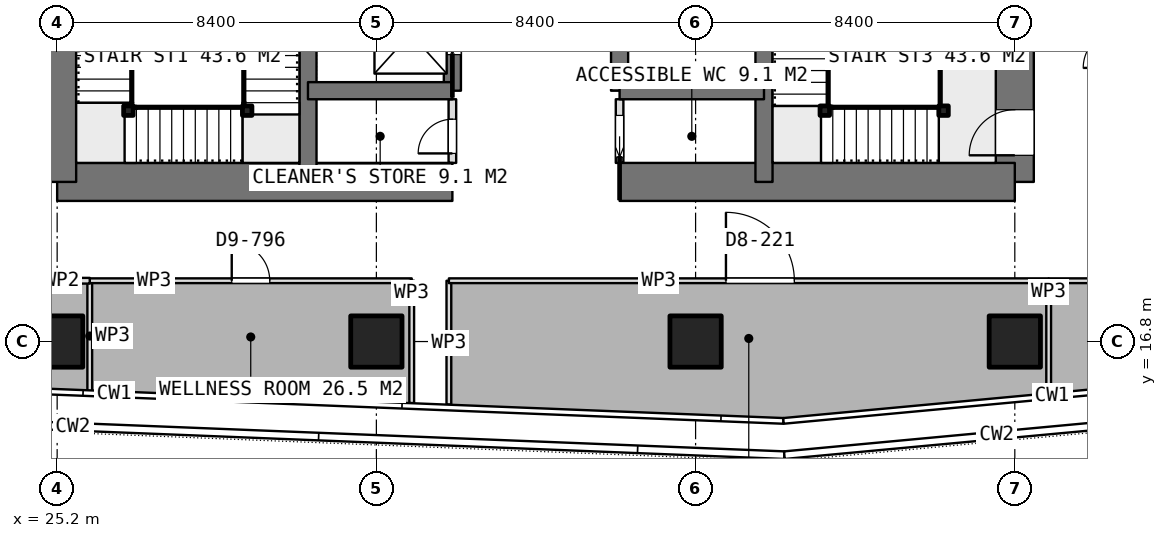
"""IFC4 building model, lengths in metres.
Left out: names, types, materials, properties, quantities, classifications, styles, units other than length and angle.
Written with IfcOpenShell. Run it as: python <this file> out.ifc"""

import sys

from ifc_helpers import new_model, si_unit, direction, frame, frame_2d, origin, origin_2d, place, context, subcontext, project, spatial, rectangle, extrude, element, fill, save


model = new_model("IFC4")
c1 = context("Model", 3, precision=1e-05, world=origin(), true_north=direction((0.0, 1.0)))
c2 = subcontext(c1, "Body", "Model", "MODEL_VIEW")
j1 = project(units=[si_unit("LENGTHUNIT", "METRE"), si_unit("PLANEANGLEUNIT", "RADIAN")], contexts=[c1])
p1 = place(None, origin())
s1 = spatial("IfcSite", under=j1, at=p1, CompositionType="ELEMENT")
p2 = place(p1, origin())
s2 = spatial("IfcBuilding", under=s1, at=p2, CompositionType="ELEMENT")
p3 = place(p2, frame((0.0, 0.0, 198.95)))
s3 = spatial("IfcBuildingStorey", under=s2, at=p3, CompositionType="ELEMENT", Elevation=198.95)
p4 = place(p3, frame((25.2, 21.0, 0.0), z_axis=(0.0, 0.0, 1.0), x_axis=(1.0, 0.0, 0.0)))
e1 = element("IfcWall", 1, at=p4, inside=s3, PredefinedType="SHEAR", context=c2, shape_type="SweptSolid", body=[
    extrude(rectangle(XDim=10.4, YDim=1.0, at=frame_2d((5.2, 0.0))), origin(), (0.0, 0.0, 1.0), 3.75),
])
p5 = place(p3, frame((40.0, 21.0, 0.0), z_axis=(0.0, 0.0, 1.0), x_axis=(1.0, 0.0, 0.0)))
e2 = element("IfcWall", 2, at=p5, inside=s3, PredefinedType="SHEAR", context=c2, shape_type="SweptSolid", body=[
    extrude(rectangle(XDim=10.4, YDim=1.0, at=frame_2d((5.2, 0.0))), origin(), (0.0, 0.0, 1.0), 3.75),
])
p6 = place(p3, frame((25.2, 21.0, 0.0), z_axis=(0.0, 0.0, 1.0), x_axis=(0.0, 1.0, 0.0)))
e3 = element("IfcWall", 3, at=p6, inside=s3, PredefinedType="SHEAR", context=c2, shape_type="SweptSolid", body=[
    extrude(rectangle(XDim=25.2, YDim=1.0, at=frame_2d((12.6, 0.0))), origin(), (0.0, 0.0, 1.0), 3.75),
])
p7 = place(p6, frame((7.8, 0.0, 0.0)))
e4 = element("IfcOpeningElement", 4, at=p7, cuts=e3, PredefinedType="OPENING", context=c2, shape_type="SweptSolid", body=[
    extrude(rectangle(XDim=1.2, YDim=2.1, at=frame_2d((0.6, 1.05))), frame((0.0, 0.51, 0.0), z_axis=(0.0, -1.0, 0.0), x_axis=(1.0, 0.0, 0.0)), (0.0, 0.0, 1.0), 1.02),
])
p8 = place(p6, frame((14.25, 0.0, 0.0)))
e5 = element("IfcOpeningElement", 5, at=p8, cuts=e3, PredefinedType="OPENING", context=c2, shape_type="SweptSolid", body=[
    extrude(rectangle(XDim=0.9, YDim=2.1, at=frame_2d((0.45, 1.05))), frame((0.0, 0.51, 0.0), z_axis=(0.0, -1.0, 0.0), x_axis=(1.0, 0.0, 0.0)), (0.0, 0.0, 1.0), 1.02),
])
p9 = place(p6, frame((16.85, 0.0, 0.0)))
e6 = element("IfcOpeningElement", 6, at=p9, cuts=e3, PredefinedType="OPENING", context=c2, shape_type="SweptSolid", body=[
    extrude(rectangle(XDim=0.9, YDim=2.1, at=frame_2d((0.45, 1.05))), frame((0.0, 0.51, 0.0), z_axis=(0.0, -1.0, 0.0), x_axis=(1.0, 0.0, 0.0)), (0.0, 0.0, 1.0), 1.02),
])
p10 = place(p6, frame((19.025, 0.0, 0.0)))
e7 = element("IfcOpeningElement", 7, at=p10, cuts=e3, PredefinedType="OPENING", context=c2, shape_type="SweptSolid", body=[
    extrude(rectangle(XDim=1.2, YDim=2.1, at=frame_2d((0.6, 1.05))), frame((0.0, 0.51, 0.0), z_axis=(0.0, -1.0, 0.0), x_axis=(1.0, 0.0, 0.0)), (0.0, 0.0, 1.0), 1.02),
])
p11 = place(p3, frame((50.4, 21.0, 0.0), z_axis=(0.0, 0.0, 1.0), x_axis=(0.0, 1.0, 0.0)))
e8 = element("IfcWall", 8, at=p11, inside=s3, PredefinedType="SHEAR", context=c2, shape_type="SweptSolid", body=[
    extrude(rectangle(XDim=25.2, YDim=1.0, at=frame_2d((12.6, 0.0))), origin(), (0.0, 0.0, 1.0), 3.75),
])
p12 = place(p11, frame((16.2, 0.0, 0.0)))
e9 = element("IfcOpeningElement", 9, at=p12, cuts=e8, PredefinedType="OPENING", context=c2, shape_type="SweptSolid", body=[
    extrude(rectangle(XDim=1.2, YDim=2.1, at=frame_2d((0.6, 1.05))), frame((0.0, 0.51, 0.0), z_axis=(0.0, -1.0, 0.0), x_axis=(1.0, 0.0, 0.0)), (0.0, 0.0, 1.0), 1.02),
])
p13 = place(p11, frame((10.05, 0.0, 0.0)))
e10 = element("IfcOpeningElement", 10, at=p13, cuts=e8, PredefinedType="OPENING", context=c2, shape_type="SweptSolid", body=[
    extrude(rectangle(XDim=0.9, YDim=2.1, at=frame_2d((0.45, 1.05))), frame((0.0, 0.51, 0.0), z_axis=(0.0, -1.0, 0.0), x_axis=(1.0, 0.0, 0.0)), (0.0, 0.0, 1.0), 1.02),
])
p14 = place(p11, frame((7.45, 0.0, 0.0)))
e11 = element("IfcOpeningElement", 11, at=p14, cuts=e8, PredefinedType="OPENING", context=c2, shape_type="SweptSolid", body=[
    extrude(rectangle(XDim=0.9, YDim=2.1, at=frame_2d((0.45, 1.05))), frame((0.0, 0.51, 0.0), z_axis=(0.0, -1.0, 0.0), x_axis=(1.0, 0.0, 0.0)), (0.0, 0.0, 1.0), 1.02),
])
p15 = place(p11, frame((0.7, 0.0, 0.0)))
e12 = element("IfcOpeningElement", 12, at=p15, cuts=e8, PredefinedType="OPENING", context=c2, shape_type="SweptSolid", body=[
    extrude(rectangle(XDim=1.2, YDim=2.1, at=frame_2d((0.6, 1.05))), frame((0.0, 0.51, 0.0), z_axis=(0.0, -1.0, 0.0), x_axis=(1.0, 0.0, 0.0)), (0.0, 0.0, 1.0), 1.02),
])
for number, where, z_axis, x_axis in (
    (13, (31.8, 21.0, 0.0), (0.0, 0.0, 1.0), (0.0, 1.0, 0.0)),
    (14, (43.8, 21.0, 0.0), (0.0, 0.0, 1.0), (0.0, 1.0, 0.0)),
):
    element("IfcWall", number, at=place(p3, frame(where, z_axis=z_axis, x_axis=x_axis)), inside=s3, PredefinedType="SHEAR", context=c2, shape_type="SweptSolid", body=[
        extrude(rectangle(XDim=25.2, YDim=0.45, at=frame_2d((12.6, 0.0))), origin(), (0.0, 0.0, 1.0), 3.75),
    ])
p16 = place(p3, frame((35.6, 23.4, 0.0), z_axis=(0.0, 0.0, 1.0), x_axis=(0.0, 1.0, 0.0)))
e15 = element("IfcWall", 15, at=p16, inside=s3, PredefinedType="SHEAR", context=c2, shape_type="SweptSolid", body=[
    extrude(rectangle(XDim=18.0, YDim=0.45, at=frame_2d((9.0, 0.0))), origin(), (0.0, 0.0, 1.0), 3.75),
])
p17 = place(p16, frame((0.95, 0.0, 0.0)))
e16 = element("IfcOpeningElement", 16, at=p17, cuts=e15, PredefinedType="OPENING", context=c2, shape_type="SweptSolid", body=[
    extrude(rectangle(XDim=1.1, YDim=2.1, at=frame_2d((0.55, 1.05))), frame((0.0, 0.235, 0.0), z_axis=(0.0, -1.0, 0.0), x_axis=(1.0, 0.0, 0.0)), (0.0, 0.0, 1.0), 0.47),
])
p18 = place(p16, frame((3.95, 0.0, 0.0)))
e17 = element("IfcOpeningElement", 17, at=p18, cuts=e15, PredefinedType="OPENING", context=c2, shape_type="SweptSolid", body=[
    extrude(rectangle(XDim=1.1, YDim=2.1, at=frame_2d((0.55, 1.05))), frame((0.0, 0.235, 0.0), z_axis=(0.0, -1.0, 0.0), x_axis=(1.0, 0.0, 0.0)), (0.0, 0.0, 1.0), 0.47),
])
p19 = place(p16, frame((6.95, 0.0, 0.0)))
e18 = element("IfcOpeningElement", 18, at=p19, cuts=e15, PredefinedType="OPENING", context=c2, shape_type="SweptSolid", body=[
    extrude(rectangle(XDim=1.1, YDim=2.1, at=frame_2d((0.55, 1.05))), frame((0.0, 0.235, 0.0), z_axis=(0.0, -1.0, 0.0), x_axis=(1.0, 0.0, 0.0)), (0.0, 0.0, 1.0), 0.47),
])
p20 = place(p16, frame((9.95, 0.0, 0.0)))
e19 = element("IfcOpeningElement", 19, at=p20, cuts=e15, PredefinedType="OPENING", context=c2, shape_type="SweptSolid", body=[
    extrude(rectangle(XDim=1.1, YDim=2.1, at=frame_2d((0.55, 1.05))), frame((0.0, 0.235, 0.0), z_axis=(0.0, -1.0, 0.0), x_axis=(1.0, 0.0, 0.0)), (0.0, 0.0, 1.0), 0.47),
])
p21 = place(p16, frame((12.95, 0.0, 0.0)))
e20 = element("IfcOpeningElement", 20, at=p21, cuts=e15, PredefinedType="OPENING", context=c2, shape_type="SweptSolid", body=[
    extrude(rectangle(XDim=1.1, YDim=2.1, at=frame_2d((0.55, 1.05))), frame((0.0, 0.235, 0.0), z_axis=(0.0, -1.0, 0.0), x_axis=(1.0, 0.0, 0.0)), (0.0, 0.0, 1.0), 0.47),
])
p22 = place(p16, frame((15.95, 0.0, 0.0)))
e21 = element("IfcOpeningElement", 21, at=p22, cuts=e15, PredefinedType="OPENING", context=c2, shape_type="SweptSolid", body=[
    extrude(rectangle(XDim=1.1, YDim=2.1, at=frame_2d((0.55, 1.05))), frame((0.0, 0.235, 0.0), z_axis=(0.0, -1.0, 0.0), x_axis=(1.0, 0.0, 0.0)), (0.0, 0.0, 1.0), 0.47),
])
p23 = place(p3, frame((40.0, 23.4, 0.0), z_axis=(0.0, 0.0, 1.0), x_axis=(0.0, 1.0, 0.0)))
e22 = element("IfcWall", 22, at=p23, inside=s3, PredefinedType="SHEAR", context=c2, shape_type="SweptSolid", body=[
    extrude(rectangle(XDim=18.0, YDim=0.45, at=frame_2d((9.0, 0.0))), origin(), (0.0, 0.0, 1.0), 3.75),
])
p24 = place(p23, frame((1.8, 0.0, 0.0)))
e23 = element("IfcOpeningElement", 23, at=p24, cuts=e22, PredefinedType="OPENING", context=c2, shape_type="SweptSolid", body=[
    extrude(rectangle(XDim=1.0, YDim=2.1, at=frame_2d((0.5, 1.05))), frame((0.0, 0.235, 0.0), z_axis=(0.0, -1.0, 0.0), x_axis=(1.0, 0.0, 0.0)), (0.0, 0.0, 1.0), 0.47),
])
p25 = place(p23, frame((5.75, 0.0, 0.0)))
e24 = element("IfcOpeningElement", 24, at=p25, cuts=e22, PredefinedType="OPENING", context=c2, shape_type="SweptSolid", body=[
    extrude(rectangle(XDim=0.9, YDim=2.1, at=frame_2d((0.45, 1.05))), frame((0.0, 0.235, 0.0), z_axis=(0.0, -1.0, 0.0), x_axis=(1.0, 0.0, 0.0)), (0.0, 0.0, 1.0), 0.47),
])
p26 = place(p23, frame((9.4, 0.0, 0.0)))
e25 = element("IfcOpeningElement", 25, at=p26, cuts=e22, PredefinedType="OPENING", context=c2, shape_type="SweptSolid", body=[
    extrude(rectangle(XDim=1.0, YDim=2.1, at=frame_2d((0.5, 1.05))), frame((0.0, 0.235, 0.0), z_axis=(0.0, -1.0, 0.0), x_axis=(1.0, 0.0, 0.0)), (0.0, 0.0, 1.0), 0.47),
])
for number, where, z_axis, x_axis in (
    (26, (31.8, 23.4, 0.0), (0.0, 0.0, 1.0), (1.0, 0.0, 0.0)),
    (27, (40.0, 23.4, 0.0), (0.0, 0.0, 1.0), (1.0, 0.0, 0.0)),
):
    element("IfcWall", number, at=place(p3, frame(where, z_axis=z_axis, x_axis=x_axis)), inside=s3, PredefinedType="SHEAR", context=c2, shape_type="SweptSolid", body=[
        extrude(rectangle(XDim=3.8, YDim=0.45, at=frame_2d((1.9, 0.0))), origin(), (0.0, 0.0, 1.0), 3.75),
    ])
for number, where, z_axis, x_axis in (
    (28, (25.2, 16.8, 0.0), (0.0, 0.0, 1.0), (1.0, 0.0, 0.0)),
    (29, (33.6, 16.8, 0.0), (0.0, 0.0, 1.0), (1.0, 0.0, 0.0)),
    (30, (42.0, 16.8, 0.0), (0.0, 0.0, 1.0), (1.0, 0.0, 0.0)),
    (31, (50.4, 16.8, 0.0), (0.0, 0.0, 1.0), (1.0, 0.0, 0.0)),
):
    element("IfcColumn", number, at=place(p3, frame(where, z_axis=z_axis, x_axis=x_axis)), inside=s3, PredefinedType="COLUMN", context=c2, shape_type="SweptSolid", body=[
        extrude(rectangle(XDim=1.35, YDim=1.35, at=origin_2d()), origin(), (0.0, 0.0, 1.0), 3.75),
    ])
p27 = place(p3, frame((40.0, 21.5, 0.0), z_axis=(0.0, 0.0, 1.0), x_axis=(0.0, 1.0, 0.0)))
e32 = element("IfcWall", 32, at=p27, inside=s3, PredefinedType="PARTITIONING", context=c2, shape_type="SweptSolid", body=[
    extrude(rectangle(XDim=1.675, YDim=0.2, at=frame_2d((0.837, 0.0))), origin(), (0.0, 0.0, 1.0), 3.5),
])
p28 = place(p27, frame((0.15, 0.0, 0.0)))
e33 = element("IfcOpeningElement", 33, at=p28, cuts=e32, PredefinedType="OPENING", context=c2, shape_type="SweptSolid", body=[
    extrude(rectangle(XDim=1.1, YDim=2.1, at=frame_2d((0.55, 1.05))), frame((0.0, 0.11, 0.0), z_axis=(0.0, -1.0, 0.0), x_axis=(1.0, 0.0, 0.0)), (0.0, 0.0, 1.0), 0.22),
])
p29 = place(p3, frame((35.6, 21.5, 0.0), z_axis=(0.0, 0.0, 1.0), x_axis=(0.0, 1.0, 0.0)))
e34 = element("IfcWall", 34, at=p29, inside=s3, PredefinedType="PARTITIONING", context=c2, shape_type="SweptSolid", body=[
    extrude(rectangle(XDim=1.675, YDim=0.2, at=frame_2d((0.837, 0.0))), origin(), (0.0, 0.0, 1.0), 3.5),
])
p30 = place(p29, frame((0.25, 0.0, 0.0)))
e35 = element("IfcOpeningElement", 35, at=p30, cuts=e34, PredefinedType="OPENING", context=c2, shape_type="SweptSolid", body=[
    extrude(rectangle(XDim=0.9, YDim=2.1, at=frame_2d((0.45, 1.05))), frame((0.0, 0.11, 0.0), z_axis=(0.0, -1.0, 0.0), x_axis=(1.0, 0.0, 0.0)), (0.0, 0.0, 1.0), 0.22),
])
p31 = place(p3, frame((51.291, 15.442, 0.0), z_axis=(0.0, 0.0, 1.0), x_axis=(0.0, 1.0, 0.0)))
e36 = element("IfcWall", 36, at=p31, inside=s3, PredefinedType="PARTITIONING", context=c2, shape_type="SweptSolid", body=[
    extrude(rectangle(XDim=2.958, YDim=0.125, at=frame_2d((1.479, 0.0))), origin(), (0.0, 0.0, 1.0), 3.5),
])
p32 = place(p3, frame((51.291, 18.4, 0.0), z_axis=(0.0, 0.0, 1.0), x_axis=(1.0, 0.0, 0.0)))
e37 = element("IfcWall", 37, at=p32, inside=s3, PredefinedType="PARTITIONING", context=c2, shape_type="SweptSolid", body=[
    extrude(rectangle(XDim=5.109, YDim=0.125, at=frame_2d((2.554, 0.0))), origin(), (0.0, 0.0, 1.0), 3.5),
])
p33 = place(p32, frame((2.055, 0.0, 0.0)))
e38 = element("IfcOpeningElement", 38, at=p33, cuts=e37, PredefinedType="OPENING", context=c2, shape_type="SweptSolid", body=[
    extrude(rectangle(XDim=1.0, YDim=2.1, at=frame_2d((0.5, 1.05))), frame((0.0, 0.073, 0.0), z_axis=(0.0, -1.0, 0.0), x_axis=(1.0, 0.0, 0.0)), (0.0, 0.0, 1.0), 0.145),
])
p34 = place(p3, frame((26.058, 15.49, 0.0), z_axis=(0.0, 0.0, 1.0), x_axis=(0.0, 1.0, 0.0)))
e39 = element("IfcWall", 39, at=p34, inside=s3, PredefinedType="PARTITIONING", context=c2, shape_type="SweptSolid", body=[
    extrude(rectangle(XDim=2.91, YDim=0.125, at=frame_2d((1.455, 0.0))), origin(), (0.0, 0.0, 1.0), 3.5),
])
p35 = place(p3, frame((26.058, 18.4, 0.0), z_axis=(0.0, 0.0, 1.0), x_axis=(1.0, 0.0, 0.0)))
e40 = element("IfcWall", 40, at=p35, inside=s3, PredefinedType="PARTITIONING", context=c2, shape_type="SweptSolid", body=[
    extrude(rectangle(XDim=8.472, YDim=0.125, at=frame_2d((4.236, 0.0))), origin(), (0.0, 0.0, 1.0), 3.5),
])
p36 = place(p35, frame((3.736, 0.0, 0.0)))
e41 = element("IfcOpeningElement", 41, at=p36, cuts=e40, PredefinedType="OPENING", context=c2, shape_type="SweptSolid", body=[
    extrude(rectangle(XDim=1.0, YDim=2.1, at=frame_2d((0.5, 1.05))), frame((0.0, 0.073, 0.0), z_axis=(0.0, -1.0, 0.0), x_axis=(1.0, 0.0, 0.0)), (0.0, 0.0, 1.0), 0.145),
])
p37 = place(p3, frame((34.53, 18.4, 0.0), z_axis=(0.0, 0.0, 1.0), x_axis=(0.0, -1.0, 0.0)))
e42 = element("IfcWall", 42, at=p37, inside=s3, PredefinedType="PARTITIONING", context=c2, shape_type="SweptSolid", body=[
    extrude(rectangle(XDim=3.218, YDim=0.125, at=frame_2d((1.609, 0.0))), origin(), (0.0, 0.0, 1.0), 3.5),
])
p38 = place(p3, frame((22.4, 18.4, 0.0), z_axis=(0.0, 0.0, 1.0), x_axis=(1.0, 0.0, 0.0)))
e43 = element("IfcWall", 43, at=p38, inside=s3, PredefinedType="PARTITIONING", context=c2, shape_type="SweptSolid", body=[
    extrude(rectangle(XDim=3.658, YDim=0.15, at=frame_2d((1.829, 0.0))), origin(), (0.0, 0.0, 1.0), 3.5),
])
p39 = place(p38, frame((1.029, 0.0, 0.0)))
e44 = element("IfcOpeningElement", 44, at=p39, cuts=e43, PredefinedType="OPENING", context=c2, shape_type="SweptSolid", body=[
    extrude(rectangle(XDim=1.0, YDim=2.1, at=frame_2d((0.5, 1.05))), frame((0.0, 0.085, 0.0), z_axis=(0.0, -1.0, 0.0), x_axis=(1.0, 0.0, 0.0)), (0.0, 0.0, 1.0), 0.17),
])
p40 = place(p3, frame((35.508, 15.143, 0.0), z_axis=(0.0, 0.0, 1.0), x_axis=(0.0, 1.0, 0.0)))
e45 = element("IfcWall", 45, at=p40, inside=s3, PredefinedType="PARTITIONING", context=c2, shape_type="SweptSolid", body=[
    extrude(rectangle(XDim=3.257, YDim=0.125, at=frame_2d((1.628, 0.0))), origin(), (0.0, 0.0, 1.0), 3.5),
])
p41 = place(p3, frame((35.508, 18.4, 0.0), z_axis=(0.0, 0.0, 1.0), x_axis=(1.0, 0.0, 0.0)))
e46 = element("IfcWall", 46, at=p41, inside=s3, PredefinedType="PARTITIONING", context=c2, shape_type="SweptSolid", body=[
    extrude(rectangle(XDim=15.783, YDim=0.125, at=frame_2d((7.892, 0.0))), origin(), (0.0, 0.0, 1.0), 3.5),
])
p42 = place(p41, frame((7.291, 0.0, 0.0)))
e47 = element("IfcOpeningElement", 47, at=p42, cuts=e46, PredefinedType="OPENING", context=c2, shape_type="SweptSolid", body=[
    extrude(rectangle(XDim=1.8, YDim=2.1, at=frame_2d((0.9, 1.05))), frame((0.0, 0.073, 0.0), z_axis=(0.0, -1.0, 0.0), x_axis=(1.0, 0.0, 0.0)), (0.0, 0.0, 1.0), 0.145),
])
for number, where, z_axis, x_axis in (
    (48, (30.2, 22.875, 0.0), (0.0, 0.0, 1.0), (1.0, 0.0, 0.0)),
    (49, (27.075, 22.875, 0.0), (0.0, 0.0, 1.0), (1.0, 0.0, 0.0)),
    (50, (48.525, 22.875, 0.0), (0.0, 0.0, 1.0), (1.0, 0.0, 0.0)),
    (51, (45.4, 22.875, 0.0), (0.0, 0.0, 1.0), (1.0, 0.0, 0.0)),
):
    element("IfcColumn", number, at=place(p3, frame(where, z_axis=z_axis, x_axis=x_axis)), inside=s3, PredefinedType="COLUMN", context=c2, shape_type="SweptSolid", body=[
        extrude(rectangle(XDim=0.25, YDim=0.25, at=origin_2d()), origin(), (0.0, 0.0, 1.0), 3.75),
    ])
p43 = place(p28, origin())
e52 = element("IfcDoor", 52, at=p43, inside=s3, OperationType="SLIDING_TO_LEFT", PredefinedType="DOOR", context=c2, shape_type="SweptSolid", body=[
    extrude(rectangle(XDim=1.1, YDim=2.1, at=frame_2d((0.55, 1.05))), frame((0.0, 0.025, 0.0), z_axis=(0.0, -1.0, 0.0), x_axis=(1.0, 0.0, 0.0)), (0.0, 0.0, 1.0), 0.05),
])
fill(e33, e52)
p44 = place(p30, origin())
e53 = element("IfcDoor", 53, at=p44, inside=s3, OperationType="SINGLE_SWING_LEFT", PredefinedType="DOOR", context=c2, shape_type="SweptSolid", body=[
    extrude(rectangle(XDim=0.9, YDim=2.1, at=frame_2d((0.45, 1.05))), frame((0.0, 0.025, 0.0), z_axis=(0.0, -1.0, 0.0), x_axis=(1.0, 0.0, 0.0)), (0.0, 0.0, 1.0), 0.05),
])
fill(e35, e53)
p45 = place(p17, origin())
e54 = element("IfcDoor", 54, at=p45, inside=s3, OperationType="SLIDING_TO_LEFT", PredefinedType="USERDEFINED", context=c2, shape_type="SweptSolid", body=[
    extrude(rectangle(XDim=1.1, YDim=2.1, at=frame_2d((0.55, 1.05))), frame((0.0, 0.025, 0.0), z_axis=(0.0, -1.0, 0.0), x_axis=(1.0, 0.0, 0.0)), (0.0, 0.0, 1.0), 0.05),
])
fill(e16, e54)
p46 = place(p36, origin())
e55 = element("IfcDoor", 55, at=p46, inside=s3, OperationType="SINGLE_SWING_LEFT", PredefinedType="DOOR", context=c2, shape_type="SweptSolid", body=[
    extrude(rectangle(XDim=1.0, YDim=2.1, at=frame_2d((0.5, 1.05))), frame((0.0, 0.025, 0.0), z_axis=(0.0, -1.0, 0.0), x_axis=(1.0, 0.0, 0.0)), (0.0, 0.0, 1.0), 0.05),
])
fill(e41, e55)
p47 = place(p42, origin())
e56 = element("IfcDoor", 56, at=p47, inside=s3, OperationType="DOUBLE_DOOR_SINGLE_SWING", PredefinedType="DOOR", context=c2, shape_type="SweptSolid", body=[
    extrude(rectangle(XDim=1.8, YDim=2.1, at=frame_2d((0.9, 1.05))), frame((0.0, 0.025, 0.0), z_axis=(0.0, -1.0, 0.0), x_axis=(1.0, 0.0, 0.0)), (0.0, 0.0, 1.0), 0.05),
])
fill(e47, e56)
p48 = place(p15, origin())
e57 = element("IfcDoor", 57, at=p48, inside=s3, OperationType="SINGLE_SWING_RIGHT", PredefinedType="DOOR", context=c2, shape_type="SweptSolid", body=[
    extrude(rectangle(XDim=1.2, YDim=2.1, at=frame_2d((0.6, 1.05))), frame((0.0, 0.025, 0.0), z_axis=(0.0, -1.0, 0.0), x_axis=(1.0, 0.0, 0.0)), (0.0, 0.0, 1.0), 0.05),
])
fill(e12, e57)
save(model, sys.argv[1])
